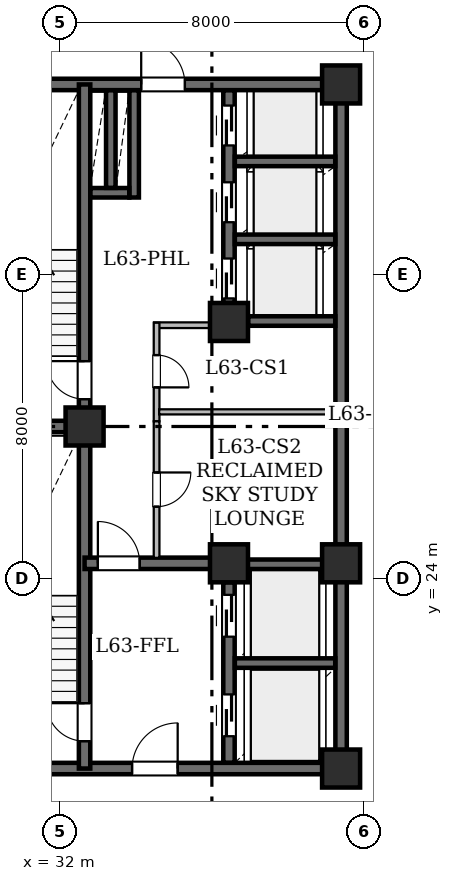
"""IFC4 building model, lengths in metres.
Left out: names, types, materials, properties, quantities, classifications, styles, units other than length and angle.
Written with IfcOpenShell. Run it as: python <this file> out.ifc"""

import sys

from ifc_helpers import new_model, si_unit, direction, frame, frame_2d, origin, origin_2d, place, context, subcontext, project, spatial, rectangle, hollow_rectangle, extrude, element, fill, save


model = new_model("IFC4")
c1 = context("Model", 3, precision=1e-05, world=origin(), true_north=direction((0.0, 1.0)))
c2 = subcontext(c1, "Body", "Model", "MODEL_VIEW")
j1 = project(units=[si_unit("LENGTHUNIT", "METRE"), si_unit("PLANEANGLEUNIT", "RADIAN")], contexts=[c1])
p1 = place(None, origin())
s1 = spatial("IfcSite", under=j1, at=p1, CompositionType="ELEMENT")
p2 = place(p1, origin())
s2 = spatial("IfcBuilding", under=s1, at=p2, CompositionType="ELEMENT")
p3 = place(p2, frame((0.0, 0.0, 246.4)))
s3 = spatial("IfcBuildingStorey", under=s2, at=p3, CompositionType="ELEMENT", Elevation=246.4)
for number, where, z_axis, x_axis in (
    (1, (32.65, 28.0, 0.0), (0.0, 0.0, 1.0), (1.0, 0.0, 0.0)),
    (2, (39.4, 19.0, 0.0), (0.0, 0.0, 1.0), (1.0, 0.0, 0.0)),
    (3, (36.45, 24.4, 0.0), (0.0, 0.0, 1.0), (1.0, 0.0, 0.0)),
    (4, (39.4, 24.4, 0.0), (0.0, 0.0, 1.0), (1.0, 0.0, 0.0)),
    (5, (36.45, 30.75, 0.0), (0.0, 0.0, 1.0), (1.0, 0.0, 0.0)),
    (6, (39.4, 37.0, 0.0), (0.0, 0.0, 1.0), (1.0, 0.0, 0.0)),
):
    element("IfcColumn", number, at=place(p3, frame(where, z_axis=z_axis, x_axis=x_axis)), inside=s3, PredefinedType="COLUMN", context=c2, shape_type="SweptSolid", body=[
        extrude(hollow_rectangle(XDim=1.0, YDim=1.0, WallThickness=0.05, at=origin_2d()), origin(), (0.0, 0.0, 1.0), 3.65),
    ])
p4 = place(p3, frame((29.0, 19.0, 0.0), z_axis=(0.0, 0.0, 1.0), x_axis=(1.0, 0.0, 0.0)))
e7 = element("IfcWall", 7, at=p4, inside=s3, PredefinedType="SHEAR", context=c2, shape_type="SweptSolid", body=[
    extrude(rectangle(XDim=10.4, YDim=0.3, at=frame_2d((5.2, 0.0))), origin(), (0.0, 0.0, 1.0), 3.43),
])
p5 = place(p4, frame((4.9, 0.0, 0.0)))
e8 = element("IfcOpeningElement", 8, at=p5, cuts=e7, PredefinedType="OPENING", context=c2, shape_type="SweptSolid", body=[
    extrude(rectangle(XDim=1.2, YDim=2.15, at=frame_2d((0.6, 1.075))), frame((0.0, 0.16, 0.0), z_axis=(0.0, -1.0, 0.0), x_axis=(1.0, 0.0, 0.0)), (0.0, 0.0, 1.0), 0.32),
])
p6 = place(p3, frame((29.0, 37.0, 0.0), z_axis=(0.0, 0.0, 1.0), x_axis=(1.0, 0.0, 0.0)))
e9 = element("IfcWall", 9, at=p6, inside=s3, PredefinedType="SHEAR", context=c2, shape_type="SweptSolid", body=[
    extrude(rectangle(XDim=10.4, YDim=0.3, at=frame_2d((5.2, 0.0))), origin(), (0.0, 0.0, 1.0), 3.43),
])
p7 = place(p6, frame((5.14, 0.0, 0.0)))
e10 = element("IfcOpeningElement", 10, at=p7, cuts=e9, PredefinedType="OPENING", context=c2, shape_type="SweptSolid", body=[
    extrude(rectangle(XDim=1.15, YDim=2.2, at=frame_2d((0.575, 1.1))), frame((0.0, 0.16, 0.0), z_axis=(0.0, -1.0, 0.0), x_axis=(1.0, 0.0, 0.0)), (0.0, 0.0, 1.0), 0.32),
])
p8 = place(p3, frame((39.4, 19.0, 0.0), z_axis=(0.0, 0.0, 1.0), x_axis=(0.0, 1.0, 0.0)))
e11 = element("IfcWall", 11, at=p8, inside=s3, PredefinedType="SHEAR", context=c2, shape_type="SweptSolid", body=[
    extrude(rectangle(XDim=5.4, YDim=0.3, at=frame_2d((2.7, 0.0))), origin(), (0.0, 0.0, 1.0), 3.43),
])
p9 = place(p3, frame((39.4, 24.4, 0.0), z_axis=(0.0, 0.0, 1.0), x_axis=(0.0, 1.0, 0.0)))
e12 = element("IfcWall", 12, at=p9, inside=s3, PredefinedType="SHEAR", context=c2, shape_type="SweptSolid", body=[
    extrude(rectangle(XDim=12.6, YDim=0.3, at=frame_2d((6.3, 0.0))), origin(), (0.0, 0.0, 1.0), 3.43),
])
p10 = place(p3, frame((32.65, 19.0, 0.0), z_axis=(0.0, 0.0, 1.0), x_axis=(0.0, 1.0, 0.0)))
e13 = element("IfcWall", 13, at=p10, inside=s3, PredefinedType="SHEAR", context=c2, shape_type="SweptSolid", body=[
    extrude(rectangle(XDim=9.0, YDim=0.3, at=frame_2d((4.5, 0.0))), origin(), (0.0, 0.0, 1.0), 3.43),
])
p11 = place(p10, frame((0.72, 0.0, 0.0)))
e14 = element("IfcOpeningElement", 14, at=p11, cuts=e13, PredefinedType="OPENING", context=c2, shape_type="SweptSolid", body=[
    extrude(rectangle(XDim=1.0, YDim=2.15, at=frame_2d((0.5, 1.075))), frame((0.0, 0.16, 0.0), z_axis=(0.0, -1.0, 0.0), x_axis=(1.0, 0.0, 0.0)), (0.0, 0.0, 1.0), 0.32),
])
p12 = place(p3, frame((32.65, 28.0, 0.0), z_axis=(0.0, 0.0, 1.0), x_axis=(0.0, 1.0, 0.0)))
e15 = element("IfcWall", 15, at=p12, inside=s3, PredefinedType="SHEAR", context=c2, shape_type="SweptSolid", body=[
    extrude(rectangle(XDim=9.0, YDim=0.3, at=frame_2d((4.5, 0.0))), origin(), (0.0, 0.0, 1.0), 3.43),
])
p13 = place(p12, frame((0.72, 0.0, 0.0)))
e16 = element("IfcOpeningElement", 16, at=p13, cuts=e15, PredefinedType="OPENING", context=c2, shape_type="SweptSolid", body=[
    extrude(rectangle(XDim=1.0, YDim=2.15, at=frame_2d((0.5, 1.075))), frame((0.0, 0.16, 0.0), z_axis=(0.0, -1.0, 0.0), x_axis=(1.0, 0.0, 0.0)), (0.0, 0.0, 1.0), 0.32),
])
p14 = place(p3, frame((29.0, 28.0, 0.0), z_axis=(0.0, 0.0, 1.0), x_axis=(1.0, 0.0, 0.0)))
e17 = element("IfcWall", 17, at=p14, inside=s3, PredefinedType="SHEAR", context=c2, shape_type="SweptSolid", body=[
    extrude(rectangle(XDim=3.65, YDim=0.3, at=frame_2d((1.825, 0.0))), origin(), (0.0, 0.0, 1.0), 3.43),
])
p15 = place(p3, frame((32.65, 24.4, 0.0), z_axis=(0.0, 0.0, 1.0), x_axis=(1.0, 0.0, 0.0)))
e18 = element("IfcWall", 18, at=p15, inside=s3, PredefinedType="SHEAR", context=c2, shape_type="SweptSolid", body=[
    extrude(rectangle(XDim=3.8, YDim=0.3, at=frame_2d((1.9, 0.0))), origin(), (0.0, 0.0, 1.0), 3.43),
])
p16 = place(p15, frame((0.35, 0.0, 0.0)))
e19 = element("IfcOpeningElement", 19, at=p16, cuts=e18, PredefinedType="OPENING", context=c2, shape_type="SweptSolid", body=[
    extrude(rectangle(XDim=1.1, YDim=2.15, at=frame_2d((0.55, 1.075))), frame((0.0, 0.16, 0.0), z_axis=(0.0, -1.0, 0.0), x_axis=(1.0, 0.0, 0.0)), (0.0, 0.0, 1.0), 0.32),
])
p17 = place(p3, frame((36.45, 19.154, 0.0), z_axis=(0.0, 0.0, 1.0), x_axis=(0.0, 1.0, 0.0)))
e20 = element("IfcWall", 20, at=p17, inside=s3, PredefinedType="SHEAR", context=c2, shape_type="SweptSolid", body=[
    extrude(rectangle(XDim=4.746, YDim=0.3, at=frame_2d((2.373, 0.0))), origin(), (0.0, 0.0, 1.0), 3.43),
])
p18 = place(p17, frame((0.696, 0.0, 0.0)))
e21 = element("IfcOpeningElement", 21, at=p18, cuts=e20, PredefinedType="OPENING", context=c2, shape_type="SweptSolid", body=[
    extrude(rectangle(XDim=1.1, YDim=2.15, at=frame_2d((0.55, 1.075))), frame((0.0, 0.16, 0.0), z_axis=(0.0, -1.0, 0.0), x_axis=(1.0, 0.0, 0.0)), (0.0, 0.0, 1.0), 0.32),
])
p19 = place(p17, frame((3.316, 0.0, 0.0)))
e22 = element("IfcOpeningElement", 22, at=p19, cuts=e20, PredefinedType="OPENING", context=c2, shape_type="SweptSolid", body=[
    extrude(rectangle(XDim=1.1, YDim=2.15, at=frame_2d((0.55, 1.075))), frame((0.0, 0.16, 0.0), z_axis=(0.0, -1.0, 0.0), x_axis=(1.0, 0.0, 0.0)), (0.0, 0.0, 1.0), 0.32),
])
p20 = place(p3, frame((36.45, 31.25, 0.0), z_axis=(0.0, 0.0, 1.0), x_axis=(0.0, 1.0, 0.0)))
e23 = element("IfcWall", 23, at=p20, inside=s3, PredefinedType="SHEAR", context=c2, shape_type="SweptSolid", body=[
    extrude(rectangle(XDim=5.596, YDim=0.3, at=frame_2d((2.798, 0.0))), origin(), (0.0, 0.0, 1.0), 3.43),
])
p21 = place(p20, frame((0.12, 0.0, 0.0)))
e24 = element("IfcOpeningElement", 24, at=p21, cuts=e23, PredefinedType="OPENING", context=c2, shape_type="SweptSolid", body=[
    extrude(rectangle(XDim=1.05, YDim=2.15, at=frame_2d((0.525, 1.075))), frame((0.0, 0.16, 0.0), z_axis=(0.0, -1.0, 0.0), x_axis=(1.0, 0.0, 0.0)), (0.0, 0.0, 1.0), 0.32),
])
p22 = place(p20, frame((2.125, 0.0, 0.0)))
e25 = element("IfcOpeningElement", 25, at=p22, cuts=e23, PredefinedType="OPENING", context=c2, shape_type="SweptSolid", body=[
    extrude(rectangle(XDim=1.05, YDim=2.15, at=frame_2d((0.525, 1.075))), frame((0.0, 0.16, 0.0), z_axis=(0.0, -1.0, 0.0), x_axis=(1.0, 0.0, 0.0)), (0.0, 0.0, 1.0), 0.32),
])
p23 = place(p20, frame((4.145, 0.0, 0.0)))
e26 = element("IfcOpeningElement", 26, at=p23, cuts=e23, PredefinedType="OPENING", context=c2, shape_type="SweptSolid", body=[
    extrude(rectangle(XDim=1.05, YDim=2.15, at=frame_2d((0.525, 1.075))), frame((0.0, 0.16, 0.0), z_axis=(0.0, -1.0, 0.0), x_axis=(1.0, 0.0, 0.0)), (0.0, 0.0, 1.0), 0.32),
])
for number, where, z_axis, x_axis in (
    (27, (36.604, 21.775, 0.0), (0.0, 0.0, 1.0), (1.0, 0.0, 0.0)),
    (28, (36.604, 24.375, 0.0), (0.0, 0.0, 1.0), (1.0, 0.0, 0.0)),
):
    element("IfcWall", number, at=place(p3, frame(where, z_axis=z_axis, x_axis=x_axis)), inside=s3, PredefinedType="SHEAR", context=c2, shape_type="SweptSolid", body=[
        extrude(rectangle(XDim=2.642, YDim=0.25, at=frame_2d((1.321, 0.0))), origin(), (0.0, 0.0, 1.0), 3.43),
    ])
p24 = place(p3, frame((36.954, 30.775, 0.0), z_axis=(0.0, 0.0, 1.0), x_axis=(1.0, 0.0, 0.0)))
e29 = element("IfcWall", 29, at=p24, inside=s3, PredefinedType="SHEAR", context=c2, shape_type="SweptSolid", body=[
    extrude(rectangle(XDim=2.292, YDim=0.25, at=frame_2d((1.146, 0.0))), origin(), (0.0, 0.0, 1.0), 3.43),
])
for number, where, z_axis, x_axis in (
    (30, (36.604, 32.925, 0.0), (0.0, 0.0, 1.0), (1.0, 0.0, 0.0)),
    (31, (36.604, 34.975, 0.0), (0.0, 0.0, 1.0), (1.0, 0.0, 0.0)),
):
    element("IfcWall", number, at=place(p3, frame(where, z_axis=z_axis, x_axis=x_axis)), inside=s3, PredefinedType="SHEAR", context=c2, shape_type="SweptSolid", body=[
        extrude(rectangle(XDim=2.642, YDim=0.25, at=frame_2d((1.321, 0.0))), origin(), (0.0, 0.0, 1.0), 3.43),
    ])
p25 = place(p3, frame((33.955, 34.025, 0.0), z_axis=(0.0, 0.0, 1.0), x_axis=(0.0, 1.0, 0.0)))
e32 = element("IfcWall", 32, at=p25, inside=s3, PredefinedType="SHEAR", context=c2, shape_type="SweptSolid", body=[
    extrude(rectangle(XDim=2.821, YDim=0.25, at=frame_2d((1.411, 0.0))), origin(), (0.0, 0.0, 1.0), 3.43),
])
p26 = place(p3, frame((32.804, 34.15, 0.0), z_axis=(0.0, 0.0, 1.0), x_axis=(1.0, 0.0, 0.0)))
e33 = element("IfcWall", 33, at=p26, inside=s3, PredefinedType="SHEAR", context=c2, shape_type="SweptSolid", body=[
    extrude(rectangle(XDim=1.022, YDim=0.25, at=frame_2d((0.511, 0.0))), origin(), (0.0, 0.0, 1.0), 3.43),
])
p27 = place(p3, frame((33.34, 34.279, 0.0), z_axis=(0.0, 0.0, 1.0), x_axis=(0.0, 1.0, 0.0)))
e34 = element("IfcWall", 34, at=p27, inside=s3, PredefinedType="SHEAR", context=c2, shape_type="SweptSolid", body=[
    extrude(rectangle(XDim=2.567, YDim=0.25, at=frame_2d((1.283, 0.0))), origin(), (0.0, 0.0, 1.0), 3.43),
])
p28 = place(p3, frame((36.3, 30.665, 0.0), z_axis=(0.0, 0.0, 1.0), x_axis=(-1.0, 0.0, 0.0)))
e35 = element("IfcWall", 35, at=p28, inside=s3, PredefinedType="STANDARD", context=c2, shape_type="SweptSolid", body=[
    extrude(rectangle(XDim=1.82, YDim=0.15, at=frame_2d((0.91, 0.0))), origin(), (0.0, 0.0, 1.0), 3.43),
])
p29 = place(p3, frame((34.545, 30.73, 0.0), z_axis=(0.0, 0.0, 1.0), x_axis=(0.0, -1.0, 0.0)))
e36 = element("IfcWall", 36, at=p29, inside=s3, PredefinedType="STANDARD", context=c2, shape_type="SweptSolid", body=[
    extrude(rectangle(XDim=2.594, YDim=0.15, at=frame_2d((1.297, 0.0))), origin(), (0.0, 0.0, 1.0), 3.43),
])
p30 = place(p29, frame((0.851, 0.0, 0.0)))
e37 = element("IfcOpeningElement", 37, at=p30, cuts=e36, PredefinedType="OPENING", context=c2, shape_type="SweptSolid", body=[
    extrude(rectangle(XDim=0.85, YDim=2.1, at=frame_2d((0.425, 1.05))), frame((0.0, 0.085, 0.0), z_axis=(0.0, -1.0, 0.0), x_axis=(1.0, 0.0, 0.0)), (0.0, 0.0, 1.0), 0.17),
])
p31 = place(p3, frame((34.545, 28.136, 0.0), z_axis=(0.0, 0.0, 1.0), x_axis=(0.0, -1.0, 0.0)))
e38 = element("IfcWall", 38, at=p31, inside=s3, PredefinedType="STANDARD", context=c2, shape_type="SweptSolid", body=[
    extrude(rectangle(XDim=3.592, YDim=0.15, at=frame_2d((1.796, 0.0))), origin(), (0.0, 0.0, 1.0), 3.43),
])
p32 = place(p31, frame((1.346, 0.0, 0.0)))
e39 = element("IfcOpeningElement", 39, at=p32, cuts=e38, PredefinedType="OPENING", context=c2, shape_type="SweptSolid", body=[
    extrude(rectangle(XDim=0.9, YDim=2.1, at=frame_2d((0.45, 1.05))), frame((0.0, 0.085, 0.0), z_axis=(0.0, -1.0, 0.0), x_axis=(1.0, 0.0, 0.0)), (0.0, 0.0, 1.0), 0.17),
])
p33 = place(p3, frame((39.256, 28.385, 0.0), z_axis=(0.0, 0.0, 1.0), x_axis=(-1.0, 0.0, 0.0)))
e40 = element("IfcWall", 40, at=p33, inside=s3, PredefinedType="PARTITIONING", context=c2, shape_type="SweptSolid", body=[
    extrude(rectangle(XDim=4.644, YDim=0.135, at=frame_2d((2.322, 0.0))), origin(), (0.0, 0.0, 1.0), 3.43),
])
p34 = place(p11, origin())
e41 = element("IfcDoor", 41, at=p34, inside=s3, OperationType="SINGLE_SWING_RIGHT", PredefinedType="DOOR", context=c2, shape_type="SweptSolid", body=[
    extrude(rectangle(XDim=1.0, YDim=2.15, at=frame_2d((0.5, 1.075))), frame((0.0, 0.025, 0.0), z_axis=(0.0, -1.0, 0.0), x_axis=(1.0, 0.0, 0.0)), (0.0, 0.0, 1.0), 0.05),
])
fill(e14, e41)
p35 = place(p13, origin())
e42 = element("IfcDoor", 42, at=p35, inside=s3, OperationType="SINGLE_SWING_RIGHT", PredefinedType="DOOR", context=c2, shape_type="SweptSolid", body=[
    extrude(rectangle(XDim=1.0, YDim=2.15, at=frame_2d((0.5, 1.075))), frame((0.0, 0.025, 0.0), z_axis=(0.0, -1.0, 0.0), x_axis=(1.0, 0.0, 0.0)), (0.0, 0.0, 1.0), 0.05),
])
fill(e16, e42)
p36 = place(p16, origin())
e43 = element("IfcDoor", 43, at=p36, inside=s3, OperationType="SINGLE_SWING_LEFT", PredefinedType="DOOR", context=c2, shape_type="SweptSolid", body=[
    extrude(rectangle(XDim=1.1, YDim=2.15, at=frame_2d((0.55, 1.075))), frame((0.0, 0.025, 0.0), z_axis=(0.0, -1.0, 0.0), x_axis=(1.0, 0.0, 0.0)), (0.0, 0.0, 1.0), 0.05),
])
fill(e19, e43)
p37 = place(p5, origin())
e44 = element("IfcDoor", 44, at=p37, inside=s3, OperationType="SINGLE_SWING_RIGHT", PredefinedType="DOOR", context=c2, shape_type="SweptSolid", body=[
    extrude(rectangle(XDim=1.2, YDim=2.15, at=frame_2d((0.6, 1.075))), frame((0.0, 0.025, 0.0), z_axis=(0.0, -1.0, 0.0), x_axis=(1.0, 0.0, 0.0)), (0.0, 0.0, 1.0), 0.05),
])
fill(e8, e44)
p38 = place(p7, origin())
e45 = element("IfcDoor", 45, at=p38, inside=s3, OperationType="SINGLE_SWING_LEFT", PredefinedType="DOOR", context=c2, shape_type="SweptSolid", body=[
    extrude(rectangle(XDim=1.15, YDim=2.2, at=frame_2d((0.575, 1.1))), frame((0.0, 0.025, 0.0), z_axis=(0.0, -1.0, 0.0), x_axis=(1.0, 0.0, 0.0)), (0.0, 0.0, 1.0), 0.05),
])
fill(e10, e45)
p39 = place(p18, origin())
e46 = element("IfcDoor", 46, at=p39, inside=s3, OperationType="SLIDING_TO_LEFT", PredefinedType="DOOR", context=c2, shape_type="SweptSolid", body=[
    extrude(rectangle(XDim=1.1, YDim=2.15, at=frame_2d((0.55, 1.075))), frame((0.0, 0.025, 0.0), z_axis=(0.0, -1.0, 0.0), x_axis=(1.0, 0.0, 0.0)), (0.0, 0.0, 1.0), 0.05),
])
fill(e21, e46)
p40 = place(p19, origin())
e47 = element("IfcDoor", 47, at=p40, inside=s3, OperationType="SLIDING_TO_LEFT", PredefinedType="DOOR", context=c2, shape_type="SweptSolid", body=[
    extrude(rectangle(XDim=1.1, YDim=2.15, at=frame_2d((0.55, 1.075))), frame((0.0, 0.025, 0.0), z_axis=(0.0, -1.0, 0.0), x_axis=(1.0, 0.0, 0.0)), (0.0, 0.0, 1.0), 0.05),
])
fill(e22, e47)
p41 = place(p21, origin())
e48 = element("IfcDoor", 48, at=p41, inside=s3, OperationType="SLIDING_TO_LEFT", PredefinedType="DOOR", context=c2, shape_type="SweptSolid", body=[
    extrude(rectangle(XDim=1.05, YDim=2.15, at=frame_2d((0.525, 1.075))), frame((0.0, 0.025, 0.0), z_axis=(0.0, -1.0, 0.0), x_axis=(1.0, 0.0, 0.0)), (0.0, 0.0, 1.0), 0.05),
])
fill(e24, e48)
p42 = place(p22, origin())
e49 = element("IfcDoor", 49, at=p42, inside=s3, OperationType="SLIDING_TO_LEFT", PredefinedType="DOOR", context=c2, shape_type="SweptSolid", body=[
    extrude(rectangle(XDim=1.05, YDim=2.15, at=frame_2d((0.525, 1.075))), frame((0.0, 0.025, 0.0), z_axis=(0.0, -1.0, 0.0), x_axis=(1.0, 0.0, 0.0)), (0.0, 0.0, 1.0), 0.05),
])
fill(e25, e49)
p43 = place(p23, origin())
e50 = element("IfcDoor", 50, at=p43, inside=s3, OperationType="SLIDING_TO_LEFT", PredefinedType="DOOR", context=c2, shape_type="SweptSolid", body=[
    extrude(rectangle(XDim=1.05, YDim=2.15, at=frame_2d((0.525, 1.075))), frame((0.0, 0.025, 0.0), z_axis=(0.0, -1.0, 0.0), x_axis=(1.0, 0.0, 0.0)), (0.0, 0.0, 1.0), 0.05),
])
fill(e26, e50)
p44 = place(p30, origin())
e51 = element("IfcDoor", 51, at=p44, inside=s3, OperationType="SINGLE_SWING_RIGHT", PredefinedType="DOOR", context=c2, shape_type="SweptSolid", body=[
    extrude(rectangle(XDim=0.85, YDim=2.1, at=frame_2d((0.425, 1.05))), frame((0.0, 0.025, 0.0), z_axis=(0.0, -1.0, 0.0), x_axis=(1.0, 0.0, 0.0)), (0.0, 0.0, 1.0), 0.05),
])
fill(e37, e51)
p45 = place(p32, origin())
e52 = element("IfcDoor", 52, at=p45, inside=s3, OperationType="SINGLE_SWING_LEFT", PredefinedType="DOOR", context=c2, shape_type="SweptSolid", body=[
    extrude(rectangle(XDim=0.9, YDim=2.1, at=frame_2d((0.45, 1.05))), frame((0.0, 0.025, 0.0), z_axis=(0.0, -1.0, 0.0), x_axis=(1.0, 0.0, 0.0)), (0.0, 0.0, 1.0), 0.05),
])
fill(e39, e52)
save(model, sys.argv[1])
